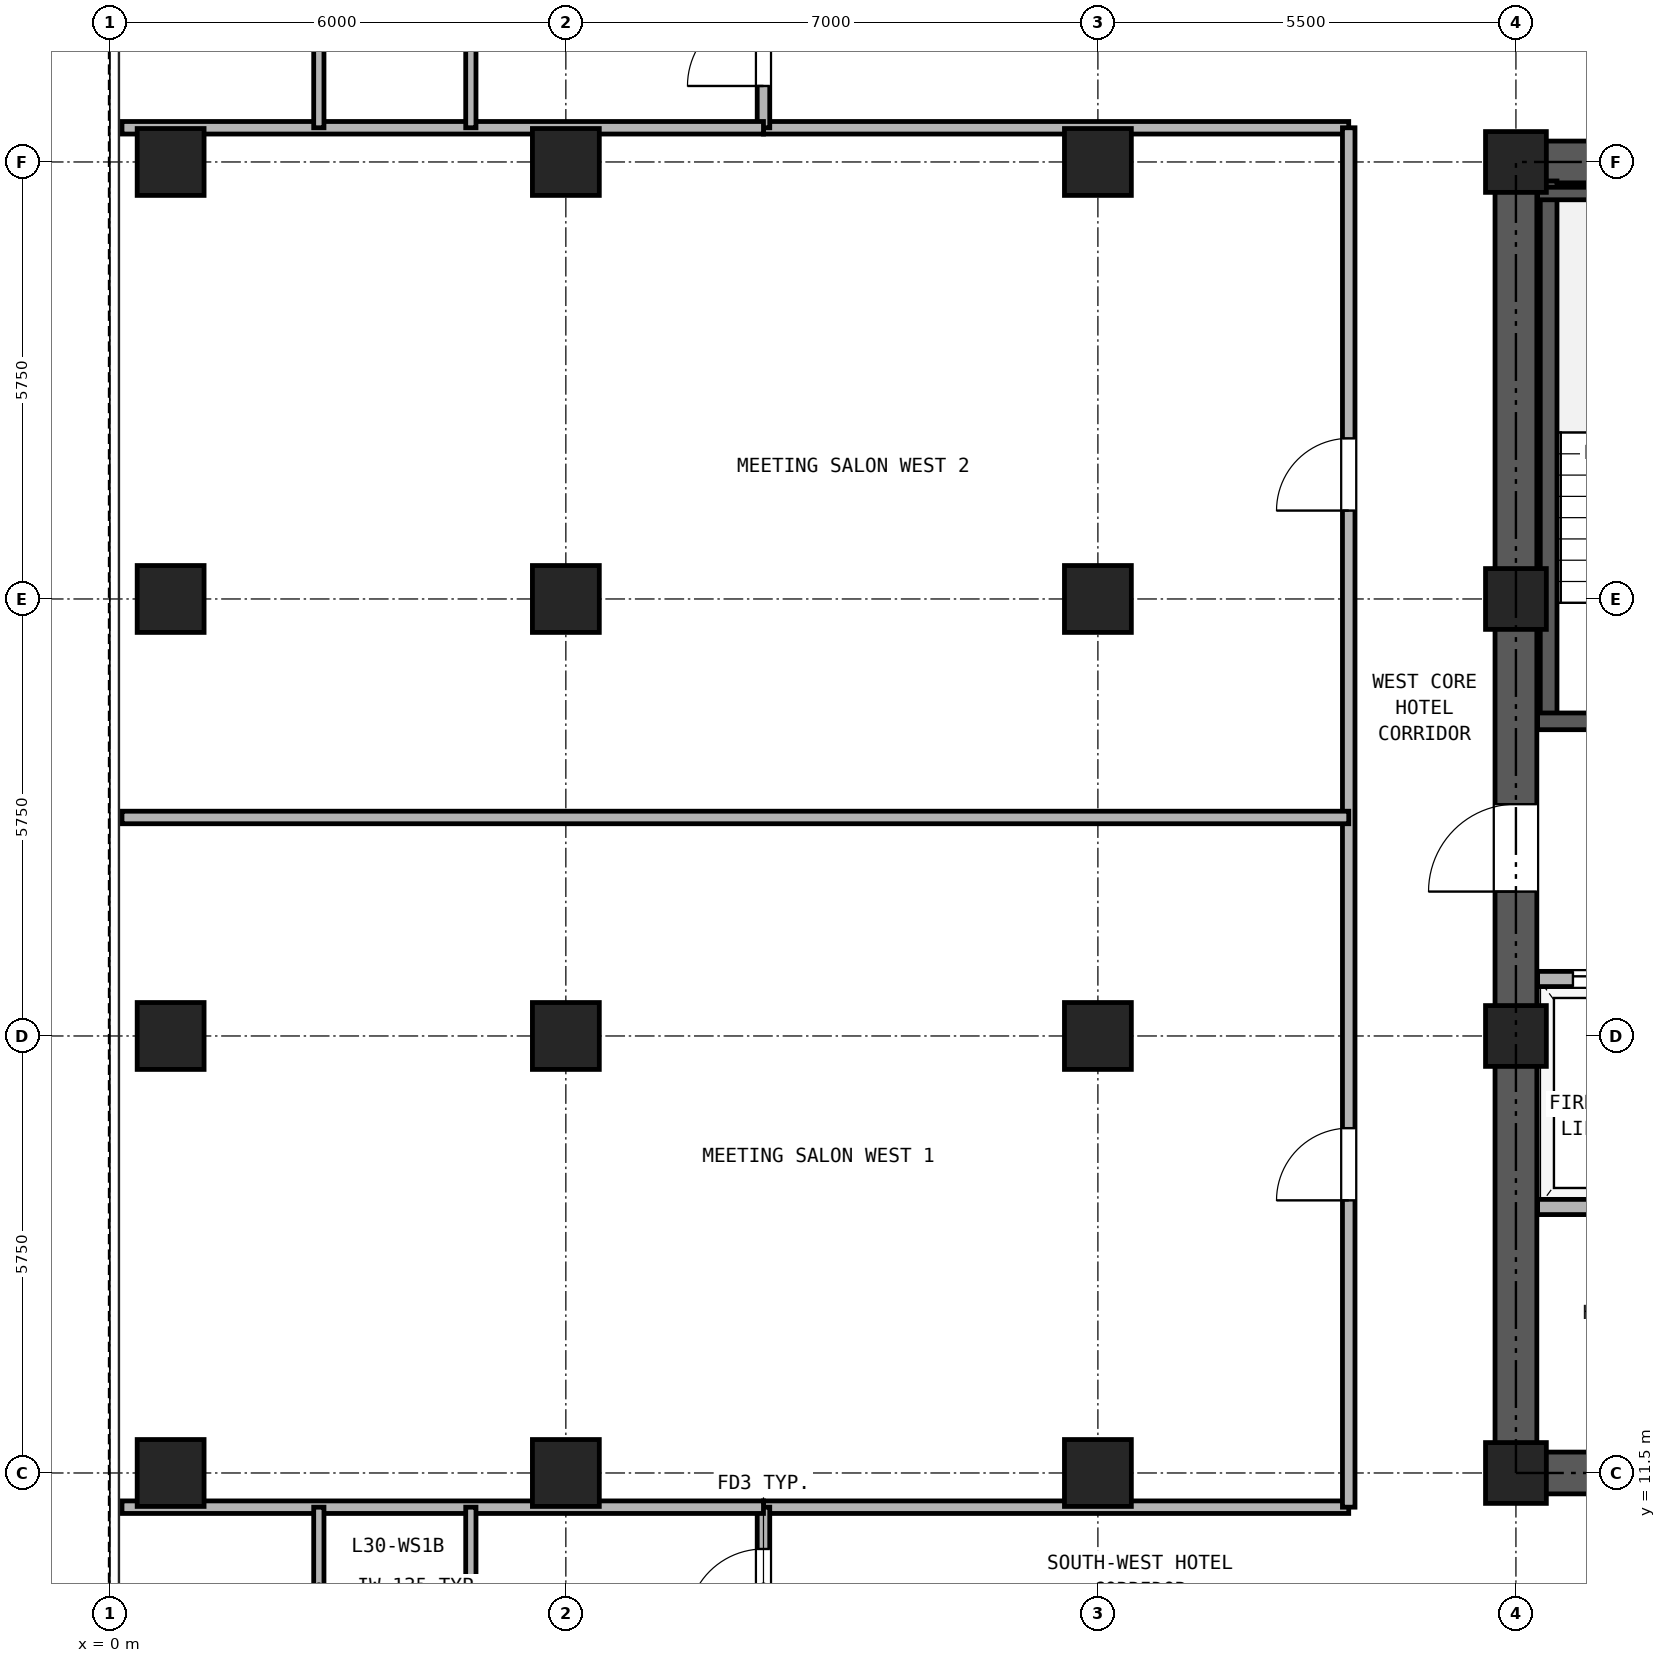
"""IFC4 building model, lengths in metres.
Left out: names, types, materials, properties, quantities, classifications, styles, units other than length and angle.
Written with IfcOpenShell. Run it as: python <this file> out.ifc"""

import sys

from ifc_helpers import new_model, si_unit, direction, frame, frame_2d, origin, origin_2d, place, context, subcontext, project, spatial, rectangle, hollow_rectangle, extrude, source, transform, mapped, element, fill, save


model = new_model("IFC4")
c1 = context("Model", 3, precision=1e-05, world=origin(), true_north=direction((0.0, 1.0)))
c2 = subcontext(c1, "Body", "Model", "MODEL_VIEW")
j1 = project(units=[si_unit("LENGTHUNIT", "METRE"), si_unit("PLANEANGLEUNIT", "RADIAN")], contexts=[c1])
p1 = place(None, origin())
s1 = spatial("IfcSite", under=j1, at=p1, CompositionType="ELEMENT")
p2 = place(p1, origin())
s2 = spatial("IfcBuilding", under=s1, at=p2, CompositionType="ELEMENT")
p3 = place(p2, frame((0.0, 0.0, 111.9)))
s3 = spatial("IfcBuildingStorey", under=s2, at=p3, CompositionType="ELEMENT", Elevation=111.9)
m1 = source(origin(), c2, "Body", "SweptSolid", [
    extrude(hollow_rectangle(XDim=0.88, YDim=0.88, WallThickness=0.05, at=origin_2d()), origin(), (0.0, 0.0, 1.0), 2.95),
])
for number, where, z_axis, x_axis in (
    (1, (0.8, 11.5, 0.0), (0.0, 0.0, 1.0), (1.0, 0.0, 0.0)),
    (2, (0.8, 17.25, 0.0), (0.0, 0.0, 1.0), (1.0, 0.0, 0.0)),
    (3, (0.8, 23.0, 0.0), (0.0, 0.0, 1.0), (1.0, 0.0, 0.0)),
    (4, (0.8, 28.75, 0.0), (0.0, 0.0, 1.0), (1.0, 0.0, 0.0)),
    (5, (6.0, 11.5, 0.0), (0.0, 0.0, 1.0), (1.0, 0.0, 0.0)),
    (6, (6.0, 17.25, 0.0), (0.0, 0.0, 1.0), (1.0, 0.0, 0.0)),
    (7, (6.0, 23.0, 0.0), (0.0, 0.0, 1.0), (1.0, 0.0, 0.0)),
    (8, (6.0, 28.75, 0.0), (0.0, 0.0, 1.0), (1.0, 0.0, 0.0)),
    (9, (13.0, 11.5, 0.0), (0.0, 0.0, 1.0), (1.0, 0.0, 0.0)),
    (10, (13.0, 17.25, 0.0), (0.0, 0.0, 1.0), (1.0, 0.0, 0.0)),
    (11, (13.0, 23.0, 0.0), (0.0, 0.0, 1.0), (1.0, 0.0, 0.0)),
    (12, (13.0, 28.75, 0.0), (0.0, 0.0, 1.0), (1.0, 0.0, 0.0)),
):
    element("IfcColumn", number, at=place(p3, frame(where, z_axis=z_axis, x_axis=x_axis)), inside=s3, PredefinedType="COLUMN", context=c2, shape_type="MappedRepresentation", body=[
        mapped(m1, transform((0.0, 0.0, 0.0), x_axis=(1.0, 0.0, 0.0), y_axis=(0.0, 1.0, 0.0), z_axis=(0.0, 0.0, 1.0), scale=1.0)),
    ])
m2 = source(origin(), c2, "Body", "SweptSolid", [
    extrude(hollow_rectangle(XDim=0.8, YDim=0.8, WallThickness=0.045, at=origin_2d()), origin(), (0.0, 0.0, 1.0), 2.95),
])
for number, where, z_axis, x_axis in (
    (13, (18.5, 11.5, 0.0), (0.0, 0.0, 1.0), (1.0, 0.0, 0.0)),
    (14, (18.5, 17.25, 0.0), (0.0, 0.0, 1.0), (1.0, 0.0, 0.0)),
    (15, (18.5, 23.0, 0.0), (0.0, 0.0, 1.0), (1.0, 0.0, 0.0)),
    (16, (18.5, 28.75, 0.0), (0.0, 0.0, 1.0), (1.0, 0.0, 0.0)),
):
    element("IfcColumn", number, at=place(p3, frame(where, z_axis=z_axis, x_axis=x_axis)), inside=s3, PredefinedType="COLUMN", context=c2, shape_type="MappedRepresentation", body=[
        mapped(m2, transform((0.0, 0.0, 0.0), x_axis=(1.0, 0.0, 0.0), y_axis=(0.0, 1.0, 0.0), z_axis=(0.0, 0.0, 1.0), scale=1.0)),
    ])
p4 = place(p3, frame((18.225, 11.5, 0.0), z_axis=(0.0, 0.0, 1.0), x_axis=(1.0, 0.0, 0.0)))
e17 = element("IfcWall", 17, at=p4, inside=s3, PredefinedType="SHEAR", context=c2, shape_type="SweptSolid", body=[
    extrude(rectangle(XDim=10.55, YDim=0.55, at=frame_2d((5.275, 0.0))), origin(), (0.0, 0.0, 1.0), 2.95),
])
p5 = place(p4, frame((2.375, 0.0, 0.0)))
e18 = element("IfcOpeningElement", 18, at=p5, cuts=e17, PredefinedType="OPENING", context=c2, shape_type="SweptSolid", body=[
    extrude(rectangle(XDim=0.95, YDim=2.15, at=frame_2d((0.475, 1.075))), frame((0.0, 0.285, 0.0), z_axis=(0.0, -1.0, 0.0), x_axis=(1.0, 0.0, 0.0)), (0.0, 0.0, 1.0), 0.57),
])
p6 = place(p4, frame((5.875, 0.0, 0.0)))
e19 = element("IfcOpeningElement", 19, at=p6, cuts=e17, PredefinedType="OPENING", context=c2, shape_type="SweptSolid", body=[
    extrude(rectangle(XDim=1.1, YDim=2.25, at=frame_2d((0.55, 1.125))), frame((0.0, 0.285, 0.0), z_axis=(0.0, -1.0, 0.0), x_axis=(1.0, 0.0, 0.0)), (0.0, 0.0, 1.0), 0.57),
])
p7 = place(p4, frame((8.275, 0.0, 0.0)))
e20 = element("IfcOpeningElement", 20, at=p7, cuts=e17, PredefinedType="OPENING", context=c2, shape_type="SweptSolid", body=[
    extrude(rectangle(XDim=1.1, YDim=2.25, at=frame_2d((0.55, 1.125))), frame((0.0, 0.285, 0.0), z_axis=(0.0, -1.0, 0.0), x_axis=(1.0, 0.0, 0.0)), (0.0, 0.0, 1.0), 0.57),
])
p8 = place(p3, frame((18.225, 28.75, 0.0), z_axis=(0.0, 0.0, 1.0), x_axis=(1.0, 0.0, 0.0)))
e21 = element("IfcWall", 21, at=p8, inside=s3, PredefinedType="SHEAR", context=c2, shape_type="SweptSolid", body=[
    extrude(rectangle(XDim=10.55, YDim=0.55, at=frame_2d((5.275, 0.0))), origin(), (0.0, 0.0, 1.0), 2.95),
])
p9 = place(p8, frame((4.155, 0.0, 0.0)))
e22 = element("IfcOpeningElement", 22, at=p9, cuts=e21, PredefinedType="OPENING", context=c2, shape_type="SweptSolid", body=[
    extrude(rectangle(XDim=0.9, YDim=2.05, at=frame_2d((0.45, 1.025))), frame((0.0, 0.285, 0.0), z_axis=(0.0, -1.0, 0.0), x_axis=(1.0, 0.0, 0.0)), (0.0, 0.0, 1.0), 0.57),
])
p10 = place(p8, frame((5.695, 0.0, 0.0)))
e23 = element("IfcOpeningElement", 23, at=p10, cuts=e21, PredefinedType="OPENING", context=c2, shape_type="SweptSolid", body=[
    extrude(rectangle(XDim=0.9, YDim=2.05, at=frame_2d((0.45, 1.025))), frame((0.0, 0.285, 0.0), z_axis=(0.0, -1.0, 0.0), x_axis=(1.0, 0.0, 0.0)), (0.0, 0.0, 1.0), 0.57),
])
p11 = place(p3, frame((18.5, 11.775, 0.0), z_axis=(0.0, 0.0, 1.0), x_axis=(0.0, 1.0, 0.0)))
e24 = element("IfcWall", 24, at=p11, inside=s3, PredefinedType="SHEAR", context=c2, shape_type="SweptSolid", body=[
    extrude(rectangle(XDim=16.7, YDim=0.55, at=frame_2d((8.35, 0.0))), origin(), (0.0, 0.0, 1.0), 2.95),
])
p12 = place(p11, frame((7.375, 0.0, 0.0)))
e25 = element("IfcOpeningElement", 25, at=p12, cuts=e24, PredefinedType="OPENING", context=c2, shape_type="SweptSolid", body=[
    extrude(rectangle(XDim=1.15, YDim=2.2, at=frame_2d((0.575, 1.1))), frame((0.0, 0.285, 0.0), z_axis=(0.0, -1.0, 0.0), x_axis=(1.0, 0.0, 0.0)), (0.0, 0.0, 1.0), 0.57),
])
p13 = place(p3, frame((18.93, 21.39, 0.0), z_axis=(0.0, 0.0, 1.0), x_axis=(0.0, 1.0, 0.0)))
e26 = element("IfcWall", 26, at=p13, inside=s3, PredefinedType="SOLIDWALL", context=c2, shape_type="SweptSolid", body=[
    extrude(rectangle(XDim=7.11, YDim=0.22, at=frame_2d((3.555, 0.0))), origin(), (0.0, 0.0, 1.0), 2.95),
])
p14 = place(p3, frame((18.785, 28.335, 0.0), z_axis=(0.0, 0.0, 1.0), x_axis=(1.0, 0.0, 0.0)))
e27 = element("IfcWall", 27, at=p14, inside=s3, PredefinedType="PARTITIONING", context=c2, shape_type="SweptSolid", body=[
    extrude(rectangle(XDim=3.325, YDim=0.165, at=frame_2d((1.663, 0.0))), origin(), (0.0, 0.0, 1.0), 2.95),
])
p15 = place(p3, frame((18.785, 21.39, 0.0), z_axis=(0.0, 0.0, 1.0), x_axis=(1.0, 0.0, 0.0)))
e28 = element("IfcWall", 28, at=p15, inside=s3, PredefinedType="SOLIDWALL", context=c2, shape_type="SweptSolid", body=[
    extrude(rectangle(XDim=6.345, YDim=0.22, at=frame_2d((3.172, 0.0))), origin(), (0.0, 0.0, 1.0), 2.95),
])
p16 = place(p15, frame((1.065, 0.0, 0.0)))
e29 = element("IfcOpeningElement", 29, at=p16, cuts=e28, PredefinedType="OPENING", context=c2, shape_type="SweptSolid", body=[
    extrude(rectangle(XDim=1.15, YDim=2.2, at=frame_2d((0.575, 1.1))), frame((0.0, 0.12, 0.0), z_axis=(0.0, -1.0, 0.0), x_axis=(1.0, 0.0, 0.0)), (0.0, 0.0, 1.0), 0.24),
])
p17 = place(p15, frame((4.795, 0.0, 0.0)))
e30 = element("IfcOpeningElement", 30, at=p17, cuts=e28, PredefinedType="OPENING", context=c2, shape_type="SweptSolid", body=[
    extrude(rectangle(XDim=1.1, YDim=2.25, at=frame_2d((0.55, 1.125))), frame((0.0, 0.12, 0.0), z_axis=(0.0, -1.0, 0.0), x_axis=(1.0, 0.0, 0.0)), (0.0, 0.0, 1.0), 0.24),
])
p18 = place(p3, frame((18.785, 18.0, 0.0), z_axis=(0.0, 0.0, 1.0), x_axis=(1.0, 0.0, 0.0)))
e31 = element("IfcWall", 31, at=p18, inside=s3, PredefinedType="PARTITIONING", context=c2, shape_type="SweptSolid", body=[
    extrude(rectangle(XDim=9.43, YDim=0.2, at=frame_2d((4.715, 0.0))), origin(), (0.0, 0.0, 1.0), 2.95),
])
p19 = place(p18, frame((0.465, 0.0, 0.0)))
e32 = element("IfcOpeningElement", 32, at=p19, cuts=e31, PredefinedType="OPENING", context=c2, shape_type="SweptSolid", body=[
    extrude(rectangle(XDim=1.3, YDim=2.3, at=frame_2d((0.65, 1.15))), frame((0.0, 0.11, 0.0), z_axis=(0.0, -1.0, 0.0), x_axis=(1.0, 0.0, 0.0)), (0.0, 0.0, 1.0), 0.22),
])
p20 = place(p18, frame((2.565, 0.0, 0.0)))
e33 = element("IfcOpeningElement", 33, at=p20, cuts=e31, PredefinedType="OPENING", context=c2, shape_type="SweptSolid", body=[
    extrude(rectangle(XDim=1.3, YDim=2.3, at=frame_2d((0.65, 1.15))), frame((0.0, 0.11, 0.0), z_axis=(0.0, -1.0, 0.0), x_axis=(1.0, 0.0, 0.0)), (0.0, 0.0, 1.0), 0.22),
])
p21 = place(p18, frame((7.065, 0.0, 0.0)))
e34 = element("IfcOpeningElement", 34, at=p21, cuts=e31, PredefinedType="OPENING", context=c2, shape_type="SweptSolid", body=[
    extrude(rectangle(XDim=1.0, YDim=2.15, at=frame_2d((0.5, 1.075))), frame((0.0, 0.11, 0.0), z_axis=(0.0, -1.0, 0.0), x_axis=(1.0, 0.0, 0.0)), (0.0, 0.0, 1.0), 0.22),
])
p22 = place(p3, frame((18.785, 15.0, 0.0), z_axis=(0.0, 0.0, 1.0), x_axis=(1.0, 0.0, 0.0)))
e35 = element("IfcWall", 35, at=p22, inside=s3, PredefinedType="PARTITIONING", context=c2, shape_type="SweptSolid", body=[
    extrude(rectangle(XDim=9.43, YDim=0.2, at=frame_2d((4.715, 0.0))), origin(), (0.0, 0.0, 1.0), 2.95),
])
for number, where, z_axis, x_axis in (
    (36, (8.6, 11.05, 0.0), (0.0, 0.0, 1.0), (1.0, 0.0, 0.0)),
    (37, (8.6, 29.2, 0.0), (0.0, 0.0, 1.0), (1.0, 0.0, 0.0)),
):
    element("IfcWall", number, at=place(p3, frame(where, z_axis=z_axis, x_axis=x_axis)), inside=s3, PredefinedType="PARTITIONING", context=c2, shape_type="SweptSolid", body=[
        extrude(rectangle(XDim=7.7, YDim=0.165, at=frame_2d((3.85, 0.0))), origin(), (0.0, 0.0, 1.0), 2.95),
    ])
p23 = place(p3, frame((16.3, 11.05, 0.0), z_axis=(0.0, 0.0, 1.0), x_axis=(0.0, 1.0, 0.0)))
e38 = element("IfcWall", 38, at=p23, inside=s3, PredefinedType="PARTITIONING", context=c2, shape_type="SweptSolid", body=[
    extrude(rectangle(XDim=18.15, YDim=0.165, at=frame_2d((9.075, 0.0))), origin(), (0.0, 0.0, 1.0), 2.95),
])
p24 = place(p23, frame((4.037, 0.0, 0.0)))
e39 = element("IfcOpeningElement", 39, at=p24, cuts=e38, PredefinedType="OPENING", context=c2, shape_type="SweptSolid", body=[
    extrude(rectangle(XDim=0.95, YDim=2.15, at=frame_2d((0.475, 1.075))), frame((0.0, 0.093, 0.0), z_axis=(0.0, -1.0, 0.0), x_axis=(1.0, 0.0, 0.0)), (0.0, 0.0, 1.0), 0.185),
])
p25 = place(p23, frame((13.113, 0.0, 0.0)))
e40 = element("IfcOpeningElement", 40, at=p25, cuts=e38, PredefinedType="OPENING", context=c2, shape_type="SweptSolid", body=[
    extrude(rectangle(XDim=0.95, YDim=2.15, at=frame_2d((0.475, 1.075))), frame((0.0, 0.093, 0.0), z_axis=(0.0, -1.0, 0.0), x_axis=(1.0, 0.0, 0.0)), (0.0, 0.0, 1.0), 0.185),
])
p26 = place(p3, frame((8.6, 0.16, 0.0), z_axis=(0.0, 0.0, 1.0), x_axis=(0.0, 1.0, 0.0)))
e41 = element("IfcWall", 41, at=p26, inside=s3, PredefinedType="PARTITIONING", context=c2, shape_type="SweptSolid", body=[
    extrude(rectangle(XDim=10.89, YDim=0.165, at=frame_2d((5.445, 0.0))), origin(), (0.0, 0.0, 1.0), 2.95),
])
p27 = place(p26, frame((9.34, 0.0, 0.0)))
e42 = element("IfcOpeningElement", 42, at=p27, cuts=e41, PredefinedType="OPENING", context=c2, shape_type="SweptSolid", body=[
    extrude(rectangle(XDim=1.0, YDim=2.15, at=frame_2d((0.5, 1.075))), frame((0.0, 0.093, 0.0), z_axis=(0.0, -1.0, 0.0), x_axis=(1.0, 0.0, 0.0)), (0.0, 0.0, 1.0), 0.185),
])
p28 = place(p3, frame((8.6, 29.2, 0.0), z_axis=(0.0, 0.0, 1.0), x_axis=(0.0, 1.0, 0.0)))
e43 = element("IfcWall", 43, at=p28, inside=s3, PredefinedType="PARTITIONING", context=c2, shape_type="SweptSolid", body=[
    extrude(rectangle(XDim=5.94, YDim=0.165, at=frame_2d((2.97, 0.0))), origin(), (0.0, 0.0, 1.0), 2.95),
])
p29 = place(p28, frame((0.55, 0.0, 0.0)))
e44 = element("IfcOpeningElement", 44, at=p29, cuts=e43, PredefinedType="OPENING", context=c2, shape_type="SweptSolid", body=[
    extrude(rectangle(XDim=1.0, YDim=2.15, at=frame_2d((0.5, 1.075))), frame((0.0, 0.093, 0.0), z_axis=(0.0, -1.0, 0.0), x_axis=(1.0, 0.0, 0.0)), (0.0, 0.0, 1.0), 0.185),
])
for number, where, z_axis, x_axis in (
    (45, (0.16, 11.05, 0.0), (0.0, 0.0, 1.0), (1.0, 0.0, 0.0)),
    (46, (0.16, 29.2, 0.0), (0.0, 0.0, 1.0), (1.0, 0.0, 0.0)),
):
    element("IfcWall", number, at=place(p3, frame(where, z_axis=z_axis, x_axis=x_axis)), inside=s3, PredefinedType="PARTITIONING", context=c2, shape_type="SweptSolid", body=[
        extrude(rectangle(XDim=8.44, YDim=0.165, at=frame_2d((4.22, 0.0))), origin(), (0.0, 0.0, 1.0), 2.95),
    ])
for number, where, z_axis, x_axis in (
    (47, (2.75, 8.95, 0.0), (0.0, 0.0, 1.0), (0.0, 1.0, 0.0)),
    (48, (4.75, 8.95, 0.0), (0.0, 0.0, 1.0), (0.0, 1.0, 0.0)),
    (49, (2.75, 29.2, 0.0), (0.0, 0.0, 1.0), (0.0, 1.0, 0.0)),
    (50, (4.75, 29.2, 0.0), (0.0, 0.0, 1.0), (0.0, 1.0, 0.0)),
):
    element("IfcWall", number, at=place(p3, frame(where, z_axis=z_axis, x_axis=x_axis)), inside=s3, PredefinedType="PARTITIONING", context=c2, shape_type="SweptSolid", body=[
        extrude(rectangle(XDim=2.1, YDim=0.135, at=frame_2d((1.05, 0.0))), origin(), (0.0, 0.0, 1.0), 2.95),
    ])
p30 = place(p3, frame((0.16, 20.125, 0.0), z_axis=(0.0, 0.0, 1.0), x_axis=(1.0, 0.0, 0.0)))
e51 = element("IfcWall", 51, at=p30, inside=s3, PredefinedType="PARTITIONING", context=c2, shape_type="SweptSolid", body=[
    extrude(rectangle(XDim=16.14, YDim=0.165, at=frame_2d((8.07, 0.0))), origin(), (0.0, 0.0, 1.0), 2.583),
])
p31 = place(p19, origin())
e52 = element("IfcDoor", 52, at=p31, inside=s3, OperationType="DOUBLE_DOOR_SLIDING", PredefinedType="DOOR", context=c2, shape_type="SweptSolid", body=[
    extrude(rectangle(XDim=1.3, YDim=2.3, at=frame_2d((0.65, 1.15))), frame((0.0, 0.025, 0.0), z_axis=(0.0, -1.0, 0.0), x_axis=(1.0, 0.0, 0.0)), (0.0, 0.0, 1.0), 0.05),
])
fill(e32, e52)
p32 = place(p12, frame((1.15, 0.0, 0.0), z_axis=(0.0, 0.0, 1.0), x_axis=(-1.0, 0.0, 0.0)))
e53 = element("IfcDoor", 53, at=p32, inside=s3, OperationType="SINGLE_SWING_LEFT", PredefinedType="DOOR", context=c2, shape_type="SweptSolid", body=[
    extrude(rectangle(XDim=1.15, YDim=2.2, at=frame_2d((0.575, 1.1))), frame((0.0, 0.025, 0.0), z_axis=(0.0, -1.0, 0.0), x_axis=(1.0, 0.0, 0.0)), (0.0, 0.0, 1.0), 0.05),
])
fill(e25, e53)
p33 = place(p27, origin())
e54 = element("IfcDoor", 54, at=p33, inside=s3, OperationType="SINGLE_SWING_LEFT", PredefinedType="DOOR", context=c2, shape_type="SweptSolid", body=[
    extrude(rectangle(XDim=1.0, YDim=2.15, at=frame_2d((0.5, 1.075))), frame((0.0, 0.025, 0.0), z_axis=(0.0, -1.0, 0.0), x_axis=(1.0, 0.0, 0.0)), (0.0, 0.0, 1.0), 0.05),
])
fill(e42, e54)
p34 = place(p29, origin())
e55 = element("IfcDoor", 55, at=p34, inside=s3, OperationType="SINGLE_SWING_LEFT", PredefinedType="DOOR", context=c2, shape_type="SweptSolid", body=[
    extrude(rectangle(XDim=1.0, YDim=2.15, at=frame_2d((0.5, 1.075))), frame((0.0, 0.025, 0.0), z_axis=(0.0, -1.0, 0.0), x_axis=(1.0, 0.0, 0.0)), (0.0, 0.0, 1.0), 0.05),
])
fill(e44, e55)
p35 = place(p24, frame((0.95, 0.0, 0.0), z_axis=(0.0, 0.0, 1.0), x_axis=(-1.0, 0.0, 0.0)))
e56 = element("IfcDoor", 56, at=p35, inside=s3, OperationType="SINGLE_SWING_LEFT", PredefinedType="DOOR", context=c2, shape_type="SweptSolid", body=[
    extrude(rectangle(XDim=0.95, YDim=2.15, at=frame_2d((0.475, 1.075))), frame((0.0, 0.025, 0.0), z_axis=(0.0, -1.0, 0.0), x_axis=(1.0, 0.0, 0.0)), (0.0, 0.0, 1.0), 0.05),
])
fill(e39, e56)
p36 = place(p25, frame((0.95, 0.0, 0.0), z_axis=(0.0, 0.0, 1.0), x_axis=(-1.0, 0.0, 0.0)))
e57 = element("IfcDoor", 57, at=p36, inside=s3, OperationType="SINGLE_SWING_LEFT", PredefinedType="DOOR", context=c2, shape_type="SweptSolid", body=[
    extrude(rectangle(XDim=0.95, YDim=2.15, at=frame_2d((0.475, 1.075))), frame((0.0, 0.025, 0.0), z_axis=(0.0, -1.0, 0.0), x_axis=(1.0, 0.0, 0.0)), (0.0, 0.0, 1.0), 0.05),
])
fill(e40, e57)
save(model, sys.argv[1])
